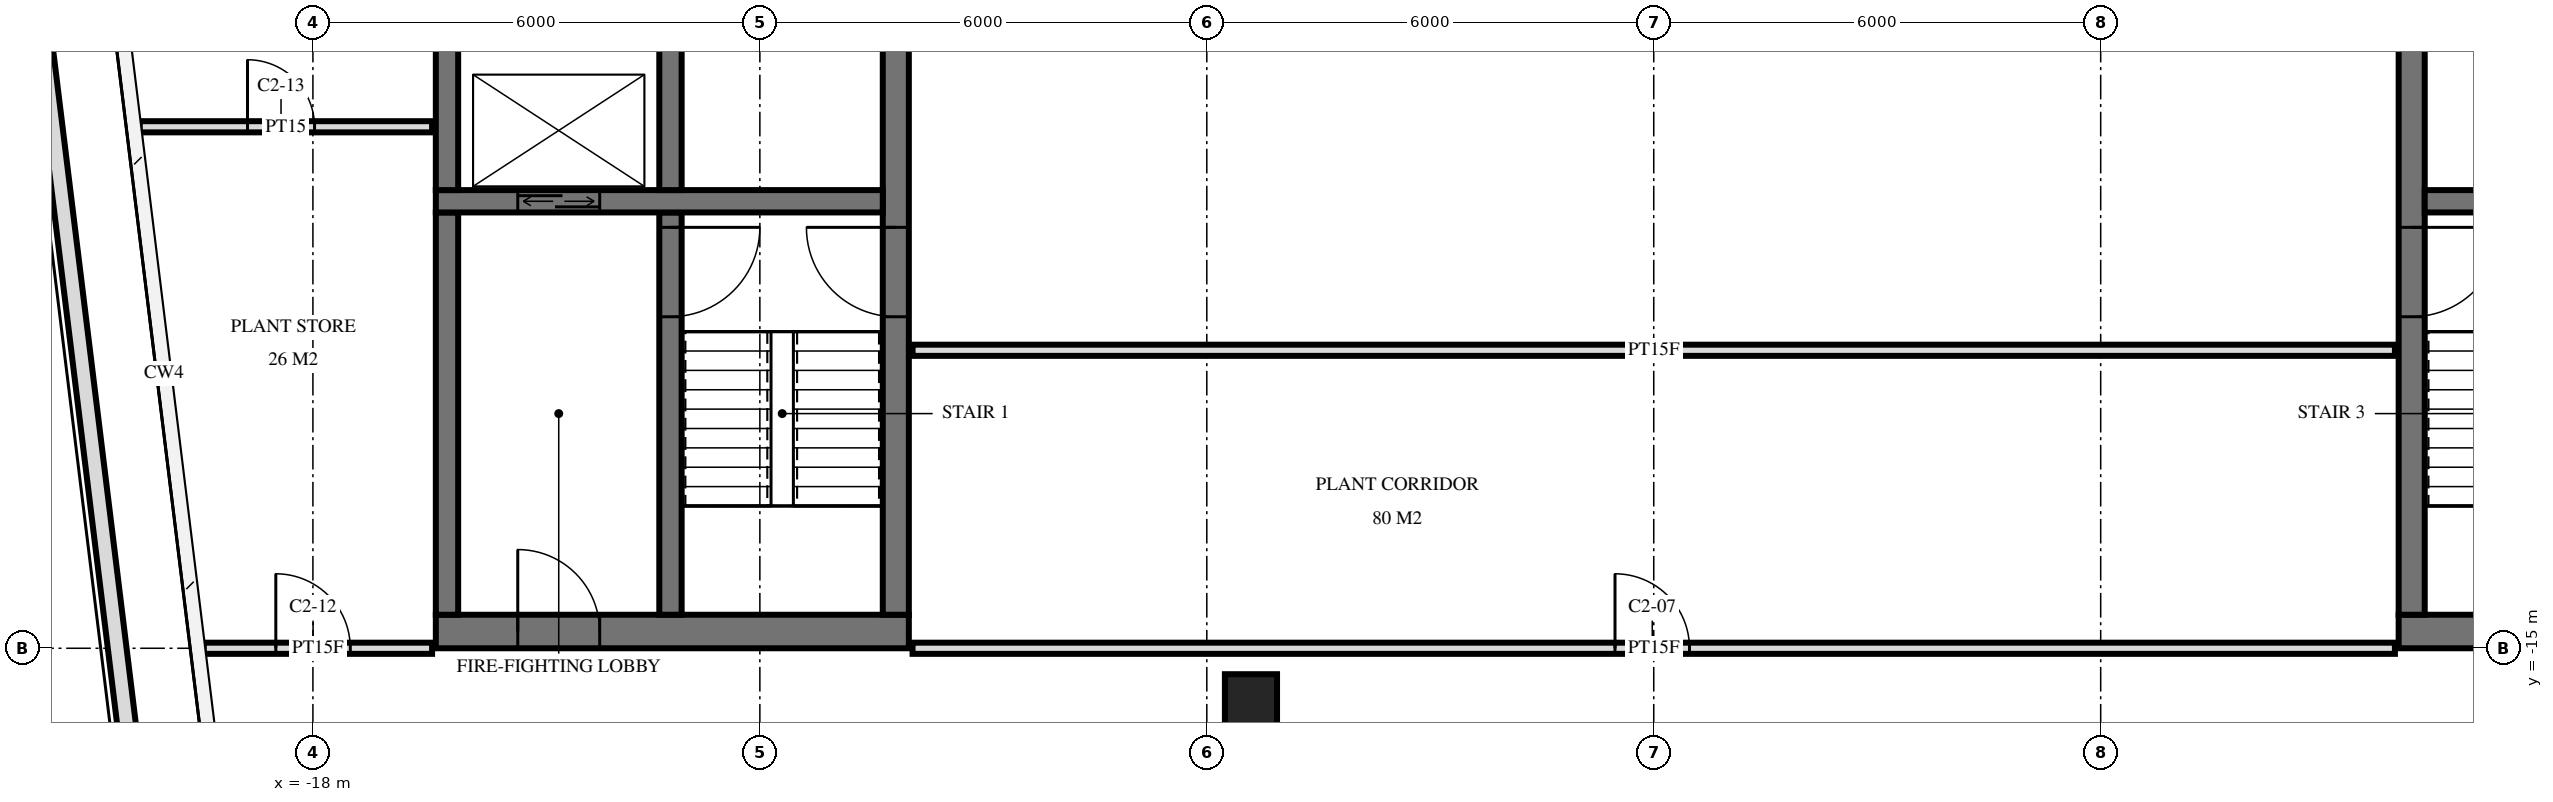
"""IFC4 building model, lengths in metres.
Left out: names, types, materials, properties, quantities, classifications, styles, units other than length and angle.
Written with IfcOpenShell. Run it as: python <this file> out.ifc"""

import sys

from ifc_helpers import new_model, si_unit, direction, frame, frame_2d, origin, origin_2d, place, context, subcontext, project, spatial, rectangle, extrude, element, fill, save


model = new_model("IFC4")
c1 = context("Model", 3, precision=1e-05, world=origin(), true_north=direction((0.0, 1.0)))
c2 = subcontext(c1, "Body", "Model", "MODEL_VIEW")
j1 = project(units=[si_unit("LENGTHUNIT", "METRE"), si_unit("PLANEANGLEUNIT", "RADIAN")], contexts=[c1])
p1 = place(None, origin())
s1 = spatial("IfcSite", under=j1, at=p1, CompositionType="ELEMENT")
p2 = place(p1, origin())
s2 = spatial("IfcBuilding", under=s1, at=p2, CompositionType="ELEMENT")
p3 = place(p2, frame((0.0, 0.0, 350.2)))
s3 = spatial("IfcBuildingStorey", under=s2, at=p3, CompositionType="ELEMENT", Elevation=350.2)
p4 = place(p3, frame((-5.407, -15.698, 0.0), z_axis=(0.0, 0.0, 1.0), x_axis=(1.0, 0.0, 0.0)))
e1 = element("IfcColumn", 1, at=p4, inside=s3, PredefinedType="COLUMN", context=c2, shape_type="SweptSolid", body=[
    extrude(rectangle(XDim=0.7, YDim=0.7, at=origin_2d()), origin(), (0.0, 0.0, 1.0), 3.6),
])
p5 = place(p3, frame((-16.35, -14.775, 0.0), z_axis=(0.0, 0.0, 1.0), x_axis=(1.0, 0.0, 0.0)))
e2 = element("IfcWall", 2, at=p5, inside=s3, PredefinedType="SHEAR", context=c2, shape_type="SweptSolid", body=[
    extrude(rectangle(XDim=6.35, YDim=0.45, at=frame_2d((3.175, 0.0))), origin(), (0.0, 0.0, 1.0), 3.6),
])
p6 = place(p5, frame((1.1, 0.0, 0.0)))
e3 = element("IfcOpeningElement", 3, at=p6, cuts=e2, PredefinedType="OPENING", context=c2, shape_type="SweptSolid", body=[
    extrude(rectangle(XDim=1.1, YDim=2.1, at=frame_2d((0.55, 1.05))), frame((0.0, 0.235, 0.0), z_axis=(0.0, -1.0, 0.0), x_axis=(1.0, 0.0, 0.0)), (0.0, 0.0, 1.0), 0.47),
])
p7 = place(p3, frame((-10.175, -14.55, 0.0), z_axis=(0.0, 0.0, 1.0), x_axis=(0.0, 1.0, 0.0)))
e4 = element("IfcWall", 4, at=p7, inside=s3, PredefinedType="SHEAR", context=c2, shape_type="SweptSolid", body=[
    extrude(rectangle(XDim=14.1, YDim=0.35, at=frame_2d((7.05, 0.0))), origin(), (0.0, 0.0, 1.0), 3.6),
])
p8 = place(p7, frame((4.0, 0.0, 0.0)))
e5 = element("IfcOpeningElement", 5, at=p8, cuts=e4, PredefinedType="OPENING", context=c2, shape_type="SweptSolid", body=[
    extrude(rectangle(XDim=1.2, YDim=2.1, at=frame_2d((0.6, 1.05))), frame((0.0, 0.185, 0.0), z_axis=(0.0, -1.0, 0.0), x_axis=(1.0, 0.0, 0.0)), (0.0, 0.0, 1.0), 0.37),
])
p9 = place(p3, frame((-16.2, -14.55, 0.0), z_axis=(0.0, 0.0, 1.0), x_axis=(0.0, 1.0, 0.0)))
e6 = element("IfcWall", 6, at=p9, inside=s3, PredefinedType="SHEAR", context=c2, shape_type="SweptSolid", body=[
    extrude(rectangle(XDim=5.4, YDim=0.3, at=frame_2d((2.7, 0.0))), origin(), (0.0, 0.0, 1.0), 3.6),
])
p10 = place(p3, frame((-16.35, -9.0, 0.0), z_axis=(0.0, 0.0, 1.0), x_axis=(1.0, 0.0, 0.0)))
e7 = element("IfcWall", 7, at=p10, inside=s3, PredefinedType="SHEAR", context=c2, shape_type="SweptSolid", body=[
    extrude(rectangle(XDim=6.0, YDim=0.3, at=frame_2d((3.0, 0.0))), origin(), (0.0, 0.0, 1.0), 3.6),
])
p11 = place(p10, frame((1.1, 0.0, 0.0)))
e8 = element("IfcOpeningElement", 8, at=p11, cuts=e7, PredefinedType="OPENING", context=c2, shape_type="SweptSolid", body=[
    extrude(rectangle(XDim=1.1, YDim=2.1, at=frame_2d((0.55, 1.05))), frame((0.0, 0.16, 0.0), z_axis=(0.0, -1.0, 0.0), x_axis=(1.0, 0.0, 0.0)), (0.0, 0.0, 1.0), 0.32),
])
p12 = place(p3, frame((-13.2, -14.55, 0.0), z_axis=(0.0, 0.0, 1.0), x_axis=(0.0, 1.0, 0.0)))
e9 = element("IfcWall", 9, at=p12, inside=s3, PredefinedType="SHEAR", context=c2, shape_type="SweptSolid", body=[
    extrude(rectangle(XDim=5.4, YDim=0.3, at=frame_2d((2.7, 0.0))), origin(), (0.0, 0.0, 1.0), 3.6),
])
p13 = place(p12, frame((4.0, 0.0, 0.0)))
e10 = element("IfcOpeningElement", 10, at=p13, cuts=e9, PredefinedType="OPENING", context=c2, shape_type="SweptSolid", body=[
    extrude(rectangle(XDim=1.2, YDim=2.1, at=frame_2d((0.6, 1.05))), frame((0.0, 0.16, 0.0), z_axis=(0.0, -1.0, 0.0), x_axis=(1.0, 0.0, 0.0)), (0.0, 0.0, 1.0), 0.32),
])
for number, where, z_axis, x_axis in (
    (11, (-13.2, -8.85, 0.0), (0.0, 0.0, 1.0), (0.0, 1.0, 0.0)),
    (12, (-16.2, -8.85, 0.0), (0.0, 0.0, 1.0), (0.0, 1.0, 0.0)),
):
    element("IfcWall", number, at=place(p3, frame(where, z_axis=z_axis, x_axis=x_axis)), inside=s3, PredefinedType="SHEAR", context=c2, shape_type="SweptSolid", body=[
        extrude(rectangle(XDim=2.3, YDim=0.3, at=frame_2d((1.15, 0.0))), origin(), (0.0, 0.0, 1.0), 3.6),
    ])
p14 = place(p3, frame((10.0, -14.775, 0.0), z_axis=(0.0, 0.0, 1.0), x_axis=(1.0, 0.0, 0.0)))
e13 = element("IfcWall", 13, at=p14, inside=s3, PredefinedType="SHEAR", context=c2, shape_type="SweptSolid", body=[
    extrude(rectangle(XDim=6.35, YDim=0.45, at=frame_2d((3.175, 0.0))), origin(), (0.0, 0.0, 1.0), 3.6),
])
p15 = place(p14, frame((4.15, 0.0, 0.0)))
e14 = element("IfcOpeningElement", 14, at=p15, cuts=e13, PredefinedType="OPENING", context=c2, shape_type="SweptSolid", body=[
    extrude(rectangle(XDim=1.1, YDim=2.1, at=frame_2d((0.55, 1.05))), frame((0.0, 0.235, 0.0), z_axis=(0.0, -1.0, 0.0), x_axis=(1.0, 0.0, 0.0)), (0.0, 0.0, 1.0), 0.47),
])
p16 = place(p3, frame((10.175, -14.55, 0.0), z_axis=(0.0, 0.0, 1.0), x_axis=(0.0, 1.0, 0.0)))
e15 = element("IfcWall", 15, at=p16, inside=s3, PredefinedType="SHEAR", context=c2, shape_type="SweptSolid", body=[
    extrude(rectangle(XDim=14.1, YDim=0.35, at=frame_2d((7.05, 0.0))), origin(), (0.0, 0.0, 1.0), 3.6),
])
p17 = place(p16, frame((4.0, 0.0, 0.0)))
e16 = element("IfcOpeningElement", 16, at=p17, cuts=e15, PredefinedType="OPENING", context=c2, shape_type="SweptSolid", body=[
    extrude(rectangle(XDim=1.2, YDim=2.1, at=frame_2d((0.6, 1.05))), frame((0.0, 0.185, 0.0), z_axis=(0.0, -1.0, 0.0), x_axis=(1.0, 0.0, 0.0)), (0.0, 0.0, 1.0), 0.37),
])
p18 = place(p3, frame((10.35, -9.0, 0.0), z_axis=(0.0, 0.0, 1.0), x_axis=(1.0, 0.0, 0.0)))
e17 = element("IfcWall", 17, at=p18, inside=s3, PredefinedType="SHEAR", context=c2, shape_type="SweptSolid", body=[
    extrude(rectangle(XDim=6.0, YDim=0.3, at=frame_2d((3.0, 0.0))), origin(), (0.0, 0.0, 1.0), 3.6),
])
p19 = place(p18, frame((3.8, 0.0, 0.0)))
e18 = element("IfcOpeningElement", 18, at=p19, cuts=e17, PredefinedType="OPENING", context=c2, shape_type="SweptSolid", body=[
    extrude(rectangle(XDim=1.1, YDim=2.1, at=frame_2d((0.55, 1.05))), frame((0.0, 0.16, 0.0), z_axis=(0.0, -1.0, 0.0), x_axis=(1.0, 0.0, 0.0)), (0.0, 0.0, 1.0), 0.32),
])
p20 = place(p3, frame((-19.861, -21.246, 0.0), z_axis=(0.0, 0.0, 1.0), x_axis=(-0.121871564083, 0.992545878974, 0.0)))
e19 = element("IfcWall", 19, at=p20, inside=s3, PredefinedType="PARAPET", context=c2, shape_type="SweptSolid", body=[
    extrude(rectangle(XDim=18.172, YDim=0.25, at=frame_2d((9.086, 0.0))), origin(), (0.0, 0.0, 1.0), 1.1),
])
p21 = place(p3, frame((-19.466, -15.0, 0.0), z_axis=(0.0, 0.0, 1.0), x_axis=(1.0, 0.0, 0.0)))
e20 = element("IfcWall", 20, at=p21, inside=s3, PredefinedType="PARTITIONING", context=c2, shape_type="SweptSolid", body=[
    extrude(rectangle(XDim=3.066, YDim=0.15, at=frame_2d((1.533, 0.0))), origin(), (0.0, 0.0, 1.0), 3.32),
])
p22 = place(p21, frame((0.968, 0.0, 0.0)))
e21 = element("IfcOpeningElement", 21, at=p22, cuts=e20, PredefinedType="OPENING", context=c2, shape_type="SweptSolid", body=[
    extrude(rectangle(XDim=1.0, YDim=2.1, at=frame_2d((0.5, 1.05))), frame((0.0, 0.085, 0.0), z_axis=(0.0, -1.0, 0.0), x_axis=(1.0, 0.0, 0.0)), (0.0, 0.0, 1.0), 0.17),
])
p23 = place(p3, frame((-9.95, -15.0, 0.0), z_axis=(0.0, 0.0, 1.0), x_axis=(1.0, 0.0, 0.0)))
e22 = element("IfcWall", 22, at=p23, inside=s3, PredefinedType="PARTITIONING", context=c2, shape_type="SweptSolid", body=[
    extrude(rectangle(XDim=19.9, YDim=0.15, at=frame_2d((9.95, 0.0))), origin(), (0.0, 0.0, 1.0), 2.684),
])
p24 = place(p23, frame((9.43, 0.0, 0.0)))
e23 = element("IfcOpeningElement", 23, at=p24, cuts=e22, PredefinedType="OPENING", context=c2, shape_type="SweptSolid", body=[
    extrude(rectangle(XDim=1.0, YDim=2.1, at=frame_2d((0.5, 1.05))), frame((0.0, 0.085, 0.0), z_axis=(0.0, -1.0, 0.0), x_axis=(1.0, 0.0, 0.0)), (0.0, 0.0, 1.0), 0.17),
])
p25 = place(p3, frame((-9.95, -11.0, 0.0), z_axis=(0.0, 0.0, 1.0), x_axis=(1.0, 0.0, 0.0)))
e24 = element("IfcWall", 24, at=p25, inside=s3, PredefinedType="PARTITIONING", context=c2, shape_type="SweptSolid", body=[
    extrude(rectangle(XDim=19.9, YDim=0.15, at=frame_2d((9.95, 0.0))), origin(), (0.0, 0.0, 1.0), 3.32),
])
p26 = place(p3, frame((-20.325, -8.0, 0.0), z_axis=(0.0, 0.0, 1.0), x_axis=(1.0, 0.0, 0.0)))
e25 = element("IfcWall", 25, at=p26, inside=s3, PredefinedType="PARTITIONING", context=c2, shape_type="SweptSolid", body=[
    extrude(rectangle(XDim=3.925, YDim=0.15, at=frame_2d((1.963, 0.0))), origin(), (0.0, 0.0, 1.0), 3.32),
])
p27 = place(p26, frame((1.447, 0.0, 0.0)))
e26 = element("IfcOpeningElement", 26, at=p27, cuts=e25, PredefinedType="OPENING", context=c2, shape_type="SweptSolid", body=[
    extrude(rectangle(XDim=0.9, YDim=2.1, at=frame_2d((0.45, 1.05))), frame((0.0, 0.085, 0.0), z_axis=(0.0, -1.0, 0.0), x_axis=(1.0, 0.0, 0.0)), (0.0, 0.0, 1.0), 0.17),
])
p28 = place(p11, origin())
e27 = element("IfcDoor", 27, at=p28, inside=s3, OperationType="DOUBLE_DOOR_SLIDING", PredefinedType="USERDEFINED", context=c2, shape_type="SweptSolid", body=[
    extrude(rectangle(XDim=1.1, YDim=2.1, at=frame_2d((0.55, 1.05))), frame((0.0, 0.025, 0.0), z_axis=(0.0, -1.0, 0.0), x_axis=(1.0, 0.0, 0.0)), (0.0, 0.0, 1.0), 0.05),
])
fill(e8, e27)
p29 = place(p8, origin())
e28 = element("IfcDoor", 28, at=p29, inside=s3, OperationType="SINGLE_SWING_LEFT", PredefinedType="DOOR", context=c2, shape_type="SweptSolid", body=[
    extrude(rectangle(XDim=1.2, YDim=2.1, at=frame_2d((0.6, 1.05))), frame((0.0, 0.025, 0.0), z_axis=(0.0, -1.0, 0.0), x_axis=(1.0, 0.0, 0.0)), (0.0, 0.0, 1.0), 0.05),
])
fill(e5, e28)
p30 = place(p6, origin())
e29 = element("IfcDoor", 29, at=p30, inside=s3, OperationType="SINGLE_SWING_RIGHT", PredefinedType="DOOR", context=c2, shape_type="SweptSolid", body=[
    extrude(rectangle(XDim=1.1, YDim=2.1, at=frame_2d((0.55, 1.05))), frame((0.0, 0.025, 0.0), z_axis=(0.0, -1.0, 0.0), x_axis=(1.0, 0.0, 0.0)), (0.0, 0.0, 1.0), 0.05),
])
fill(e3, e29)
p31 = place(p13, frame((0.6, 0.0, 0.0), z_axis=(0.0, 0.0, 1.0), x_axis=(-1.0, 0.0, 0.0)))
e30 = element("IfcDoor", 30, at=p31, inside=s3, OperationType="SINGLE_SWING_RIGHT", PredefinedType="DOOR", context=c2, shape_type="SweptSolid", body=[
    extrude(rectangle(XDim=1.2, YDim=2.1, at=frame_2d((0.0, 1.05))), frame((0.0, -0.025, 0.0), z_axis=(0.0, 1.0, 0.0), x_axis=(-1.0, 0.0, 0.0)), (0.0, 0.0, 1.0), 0.05),
])
fill(e10, e30)
p32 = place(p17, frame((0.6, 0.0, 0.0), z_axis=(0.0, 0.0, 1.0), x_axis=(-1.0, 0.0, 0.0)))
e31 = element("IfcDoor", 31, at=p32, inside=s3, OperationType="SINGLE_SWING_RIGHT", PredefinedType="DOOR", context=c2, shape_type="SweptSolid", body=[
    extrude(rectangle(XDim=1.2, YDim=2.1, at=frame_2d((0.0, 1.05))), frame((0.0, -0.025, 0.0), z_axis=(0.0, 1.0, 0.0), x_axis=(-1.0, 0.0, 0.0)), (0.0, 0.0, 1.0), 0.05),
])
fill(e16, e31)
p33 = place(p24, origin())
e32 = element("IfcDoor", 32, at=p33, inside=s3, OperationType="SINGLE_SWING_RIGHT", PredefinedType="DOOR", context=c2, shape_type="SweptSolid", body=[
    extrude(rectangle(XDim=1.0, YDim=2.1, at=frame_2d((0.5, 1.05))), frame((0.0, 0.025, 0.0), z_axis=(0.0, -1.0, 0.0), x_axis=(1.0, 0.0, 0.0)), (0.0, 0.0, 1.0), 0.05),
])
fill(e23, e32)
p34 = place(p22, origin())
e33 = element("IfcDoor", 33, at=p34, inside=s3, OperationType="SINGLE_SWING_RIGHT", PredefinedType="DOOR", context=c2, shape_type="SweptSolid", body=[
    extrude(rectangle(XDim=1.0, YDim=2.1, at=frame_2d((0.5, 1.05))), frame((0.0, 0.025, 0.0), z_axis=(0.0, -1.0, 0.0), x_axis=(1.0, 0.0, 0.0)), (0.0, 0.0, 1.0), 0.05),
])
fill(e21, e33)
p35 = place(p27, origin())
e34 = element("IfcDoor", 34, at=p35, inside=s3, OperationType="SINGLE_SWING_RIGHT", PredefinedType="DOOR", context=c2, shape_type="SweptSolid", body=[
    extrude(rectangle(XDim=0.9, YDim=2.1, at=frame_2d((0.45, 1.05))), frame((0.0, 0.025, 0.0), z_axis=(0.0, -1.0, 0.0), x_axis=(1.0, 0.0, 0.0)), (0.0, 0.0, 1.0), 0.05),
])
fill(e26, e34)
save(model, sys.argv[1])
